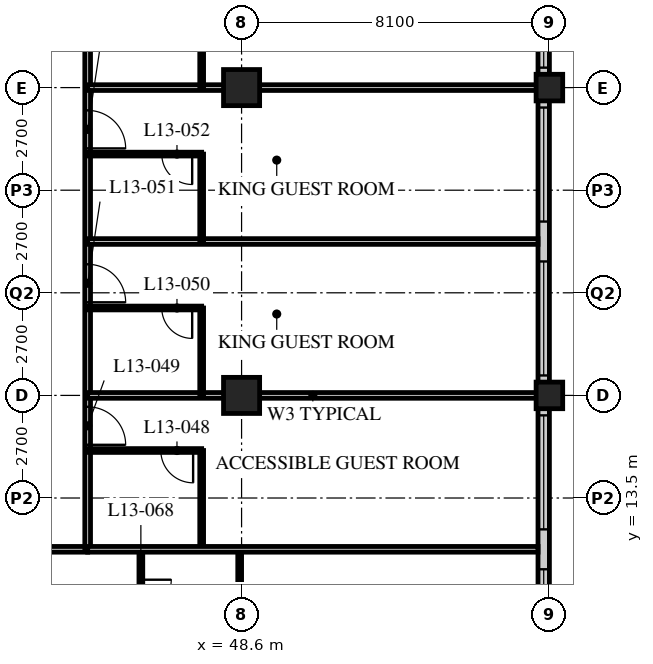
"""IFC4 building model, lengths in metres.
Left out: names, types, materials, properties, quantities, classifications, styles, units other than length and angle.
Written with IfcOpenShell. Run it as: python <this file> out.ifc"""

import sys

from ifc_helpers import new_model, si_unit, direction, frame, frame_2d, origin, origin_2d, place, context, subcontext, project, spatial, rectangle, hollow_rectangle, extrude, element, fill, save


model = new_model("IFC4")
c1 = context("Model", 3, precision=1e-05, world=origin(), true_north=direction((0.0, 1.0)))
c2 = subcontext(c1, "Body", "Model", "MODEL_VIEW")
j1 = project(units=[si_unit("LENGTHUNIT", "METRE"), si_unit("PLANEANGLEUNIT", "RADIAN")], contexts=[c1])
p1 = place(None, origin())
s1 = spatial("IfcSite", under=j1, at=p1, CompositionType="ELEMENT")
p2 = place(p1, origin())
s2 = spatial("IfcBuilding", under=s1, at=p2, CompositionType="ELEMENT")
p3 = place(p2, frame((0.0, 0.0, 56.8)))
s3 = spatial("IfcBuildingStorey", under=s2, at=p3, CompositionType="ELEMENT", Elevation=56.8)
for number, where, z_axis, x_axis in (
    (1, (48.6, 16.2, 0.0), (0.0, 0.0, 1.0), (1.0, 0.0, 0.0)),
    (2, (48.6, 24.3, 0.0), (0.0, 0.0, 1.0), (1.0, 0.0, 0.0)),
):
    element("IfcColumn", number, at=place(p3, frame(where, z_axis=z_axis, x_axis=x_axis)), inside=s3, PredefinedType="COLUMN", context=c2, shape_type="SweptSolid", body=[
        extrude(hollow_rectangle(XDim=0.95, YDim=0.95, WallThickness=0.095, at=origin_2d()), origin(), (0.0, 0.0, 1.0), 3.4),
    ])
for number, where, z_axis, x_axis in (
    (3, (56.7, 16.2, 0.0), (0.0, 0.0, 1.0), (1.0, 0.0, 0.0)),
    (4, (56.7, 24.3, 0.0), (0.0, 0.0, 1.0), (1.0, 0.0, 0.0)),
):
    element("IfcColumn", number, at=place(p3, frame(where, z_axis=z_axis, x_axis=x_axis)), inside=s3, PredefinedType="COLUMN", context=c2, shape_type="SweptSolid", body=[
        extrude(hollow_rectangle(XDim=0.7, YDim=0.7, WallThickness=0.06, at=origin_2d()), origin(), (0.0, 0.0, 1.0), 3.4),
    ])
p4 = place(p3, frame((56.55, 8.4, 0.0), z_axis=(0.0, 0.0, 1.0), x_axis=(0.0, 1.0, 0.0)))
e5 = element("IfcWall", 5, at=p4, inside=s3, PredefinedType="SOLIDWALL", context=c2, shape_type="SweptSolid", body=[
    extrude(rectangle(XDim=32.1, YDim=0.3, at=frame_2d((16.05, 0.0))), origin(), (0.0, 0.0, 1.0), 3.19),
])
p5 = place(p4, frame((0.225, 0.0, 0.9)))
e6 = element("IfcOpeningElement", 6, at=p5, cuts=e5, PredefinedType="OPENING", context=c2, shape_type="SweptSolid", body=[
    extrude(rectangle(XDim=3.0, YDim=2.0, at=frame_2d((1.5, 1.0))), frame((0.0, 0.16, 0.0), z_axis=(0.0, -1.0, 0.0), x_axis=(1.0, 0.0, 0.0)), (0.0, 0.0, 1.0), 0.32),
])
p6 = place(p4, frame((4.275, 0.0, 0.9)))
e7 = element("IfcOpeningElement", 7, at=p6, cuts=e5, PredefinedType="OPENING", context=c2, shape_type="SweptSolid", body=[
    extrude(rectangle(XDim=3.0, YDim=2.0, at=frame_2d((1.5, 1.0))), frame((0.0, 0.16, 0.0), z_axis=(0.0, -1.0, 0.0), x_axis=(1.0, 0.0, 0.0)), (0.0, 0.0, 1.0), 0.32),
])
p7 = place(p4, frame((8.325, 0.0, 0.9)))
e8 = element("IfcOpeningElement", 8, at=p7, cuts=e5, PredefinedType="OPENING", context=c2, shape_type="SweptSolid", body=[
    extrude(rectangle(XDim=3.0, YDim=2.0, at=frame_2d((1.5, 1.0))), frame((0.0, 0.16, 0.0), z_axis=(0.0, -1.0, 0.0), x_axis=(1.0, 0.0, 0.0)), (0.0, 0.0, 1.0), 0.32),
])
p8 = place(p4, frame((12.375, 0.0, 0.9)))
e9 = element("IfcOpeningElement", 9, at=p8, cuts=e5, PredefinedType="OPENING", context=c2, shape_type="SweptSolid", body=[
    extrude(rectangle(XDim=3.0, YDim=2.0, at=frame_2d((1.5, 1.0))), frame((0.0, 0.16, 0.0), z_axis=(0.0, -1.0, 0.0), x_axis=(1.0, 0.0, 0.0)), (0.0, 0.0, 1.0), 0.32),
])
p9 = place(p4, frame((16.425, 0.0, 0.9)))
e10 = element("IfcOpeningElement", 10, at=p9, cuts=e5, PredefinedType="OPENING", context=c2, shape_type="SweptSolid", body=[
    extrude(rectangle(XDim=3.0, YDim=2.0, at=frame_2d((1.5, 1.0))), frame((0.0, 0.16, 0.0), z_axis=(0.0, -1.0, 0.0), x_axis=(1.0, 0.0, 0.0)), (0.0, 0.0, 1.0), 0.32),
])
p10 = place(p4, frame((20.475, 0.0, 0.9)))
e11 = element("IfcOpeningElement", 11, at=p10, cuts=e5, PredefinedType="OPENING", context=c2, shape_type="SweptSolid", body=[
    extrude(rectangle(XDim=3.0, YDim=2.0, at=frame_2d((1.5, 1.0))), frame((0.0, 0.16, 0.0), z_axis=(0.0, -1.0, 0.0), x_axis=(1.0, 0.0, 0.0)), (0.0, 0.0, 1.0), 0.32),
])
p11 = place(p4, frame((24.525, 0.0, 0.9)))
e12 = element("IfcOpeningElement", 12, at=p11, cuts=e5, PredefinedType="OPENING", context=c2, shape_type="SweptSolid", body=[
    extrude(rectangle(XDim=3.0, YDim=2.0, at=frame_2d((1.5, 1.0))), frame((0.0, 0.16, 0.0), z_axis=(0.0, -1.0, 0.0), x_axis=(1.0, 0.0, 0.0)), (0.0, 0.0, 1.0), 0.32),
])
p12 = place(p4, frame((28.575, 0.0, 0.9)))
e13 = element("IfcOpeningElement", 13, at=p12, cuts=e5, PredefinedType="OPENING", context=c2, shape_type="SweptSolid", body=[
    extrude(rectangle(XDim=3.0, YDim=2.0, at=frame_2d((1.5, 1.0))), frame((0.0, 0.16, 0.0), z_axis=(0.0, -1.0, 0.0), x_axis=(1.0, 0.0, 0.0)), (0.0, 0.0, 1.0), 0.32),
])
p13 = place(p3, frame((12.15, 12.15, 0.0), z_axis=(0.0, 0.0, 1.0), x_axis=(1.0, 0.0, 0.0)))
e14 = element("IfcWall", 14, at=p13, inside=s3, PredefinedType="PARTITIONING", context=c2, shape_type="SweptSolid", body=[
    extrude(rectangle(XDim=32.4, YDim=0.15, at=frame_2d((16.2, 0.0))), origin(), (0.0, 0.0, 1.0), 3.19),
])
p14 = place(p13, frame((6.5, 0.0, 0.0)))
e15 = element("IfcOpeningElement", 15, at=p14, cuts=e14, PredefinedType="OPENING", context=c2, shape_type="SweptSolid", body=[
    extrude(rectangle(XDim=1.0, YDim=2.1, at=frame_2d((0.5, 1.05))), frame((0.0, 0.085, 0.0), z_axis=(0.0, -1.0, 0.0), x_axis=(1.0, 0.0, 0.0)), (0.0, 0.0, 1.0), 0.17),
])
p15 = place(p13, frame((8.4, 0.0, 0.0)))
e16 = element("IfcOpeningElement", 16, at=p15, cuts=e14, PredefinedType="OPENING", context=c2, shape_type="SweptSolid", body=[
    extrude(rectangle(XDim=1.0, YDim=2.1, at=frame_2d((0.5, 1.05))), frame((0.0, 0.085, 0.0), z_axis=(0.0, -1.0, 0.0), x_axis=(1.0, 0.0, 0.0)), (0.0, 0.0, 1.0), 0.17),
])
p16 = place(p13, frame((14.6, 0.0, 0.0)))
e17 = element("IfcOpeningElement", 17, at=p16, cuts=e14, PredefinedType="OPENING", context=c2, shape_type="SweptSolid", body=[
    extrude(rectangle(XDim=1.0, YDim=2.1, at=frame_2d((0.5, 1.05))), frame((0.0, 0.085, 0.0), z_axis=(0.0, -1.0, 0.0), x_axis=(1.0, 0.0, 0.0)), (0.0, 0.0, 1.0), 0.17),
])
p17 = place(p13, frame((18.65, 0.0, 0.0)))
e18 = element("IfcOpeningElement", 18, at=p17, cuts=e14, PredefinedType="OPENING", context=c2, shape_type="SweptSolid", body=[
    extrude(rectangle(XDim=1.0, YDim=2.1, at=frame_2d((0.5, 1.05))), frame((0.0, 0.085, 0.0), z_axis=(0.0, -1.0, 0.0), x_axis=(1.0, 0.0, 0.0)), (0.0, 0.0, 1.0), 0.17),
])
p18 = place(p13, frame((20.55, 0.0, 0.0)))
e19 = element("IfcOpeningElement", 19, at=p18, cuts=e14, PredefinedType="OPENING", context=c2, shape_type="SweptSolid", body=[
    extrude(rectangle(XDim=1.0, YDim=2.1, at=frame_2d((0.5, 1.05))), frame((0.0, 0.085, 0.0), z_axis=(0.0, -1.0, 0.0), x_axis=(1.0, 0.0, 0.0)), (0.0, 0.0, 1.0), 0.17),
])
p19 = place(p13, frame((26.75, 0.0, 0.0)))
e20 = element("IfcOpeningElement", 20, at=p19, cuts=e14, PredefinedType="OPENING", context=c2, shape_type="SweptSolid", body=[
    extrude(rectangle(XDim=1.0, YDim=2.1, at=frame_2d((0.5, 1.05))), frame((0.0, 0.085, 0.0), z_axis=(0.0, -1.0, 0.0), x_axis=(1.0, 0.0, 0.0)), (0.0, 0.0, 1.0), 0.17),
])
p20 = place(p13, frame((1.525, 0.0, 0.0)))
e21 = element("IfcOpeningElement", 21, at=p20, cuts=e14, PredefinedType="OPENING", context=c2, shape_type="SweptSolid", body=[
    extrude(rectangle(XDim=1.0, YDim=2.1, at=frame_2d((0.5, 1.05))), frame((0.0, 0.085, 0.0), z_axis=(0.0, -1.0, 0.0), x_axis=(1.0, 0.0, 0.0)), (0.0, 0.0, 1.0), 0.17),
])
p21 = place(p13, frame((29.875, 0.0, 0.0)))
e22 = element("IfcOpeningElement", 22, at=p21, cuts=e14, PredefinedType="OPENING", context=c2, shape_type="SweptSolid", body=[
    extrude(rectangle(XDim=1.0, YDim=2.1, at=frame_2d((0.5, 1.05))), frame((0.0, 0.085, 0.0), z_axis=(0.0, -1.0, 0.0), x_axis=(1.0, 0.0, 0.0)), (0.0, 0.0, 1.0), 0.17),
])
p22 = place(p3, frame((44.55, 12.15, 0.0), z_axis=(0.0, 0.0, 1.0), x_axis=(0.0, 1.0, 0.0)))
e23 = element("IfcWall", 23, at=p22, inside=s3, PredefinedType="PARTITIONING", context=c2, shape_type="SweptSolid", body=[
    extrude(rectangle(XDim=30.15, YDim=0.15, at=frame_2d((15.075, 0.0))), origin(), (0.0, 0.0, 1.0), 3.19),
])
p23 = place(p22, frame((2.75, 0.0, 0.0)))
e24 = element("IfcOpeningElement", 24, at=p23, cuts=e23, PredefinedType="OPENING", context=c2, shape_type="SweptSolid", body=[
    extrude(rectangle(XDim=1.0, YDim=2.1, at=frame_2d((0.5, 1.05))), frame((0.0, 0.085, 0.0), z_axis=(0.0, -1.0, 0.0), x_axis=(1.0, 0.0, 0.0)), (0.0, 0.0, 1.0), 0.17),
])
p24 = place(p22, frame((6.5, 0.0, 0.0)))
e25 = element("IfcOpeningElement", 25, at=p24, cuts=e23, PredefinedType="OPENING", context=c2, shape_type="SweptSolid", body=[
    extrude(rectangle(XDim=1.0, YDim=2.1, at=frame_2d((0.5, 1.05))), frame((0.0, 0.085, 0.0), z_axis=(0.0, -1.0, 0.0), x_axis=(1.0, 0.0, 0.0)), (0.0, 0.0, 1.0), 0.17),
])
p25 = place(p22, frame((10.55, 0.0, 0.0)))
e26 = element("IfcOpeningElement", 26, at=p25, cuts=e23, PredefinedType="OPENING", context=c2, shape_type="SweptSolid", body=[
    extrude(rectangle(XDim=1.0, YDim=2.1, at=frame_2d((0.5, 1.05))), frame((0.0, 0.085, 0.0), z_axis=(0.0, -1.0, 0.0), x_axis=(1.0, 0.0, 0.0)), (0.0, 0.0, 1.0), 0.17),
])
p26 = place(p22, frame((14.6, 0.0, 0.0)))
e27 = element("IfcOpeningElement", 27, at=p26, cuts=e23, PredefinedType="OPENING", context=c2, shape_type="SweptSolid", body=[
    extrude(rectangle(XDim=1.0, YDim=2.1, at=frame_2d((0.5, 1.05))), frame((0.0, 0.085, 0.0), z_axis=(0.0, -1.0, 0.0), x_axis=(1.0, 0.0, 0.0)), (0.0, 0.0, 1.0), 0.17),
])
p27 = place(p22, frame((18.65, 0.0, 0.0)))
e28 = element("IfcOpeningElement", 28, at=p27, cuts=e23, PredefinedType="OPENING", context=c2, shape_type="SweptSolid", body=[
    extrude(rectangle(XDim=1.0, YDim=2.1, at=frame_2d((0.5, 1.05))), frame((0.0, 0.085, 0.0), z_axis=(0.0, -1.0, 0.0), x_axis=(1.0, 0.0, 0.0)), (0.0, 0.0, 1.0), 0.17),
])
p28 = place(p22, frame((22.7, 0.0, 0.0)))
e29 = element("IfcOpeningElement", 29, at=p28, cuts=e23, PredefinedType="OPENING", context=c2, shape_type="SweptSolid", body=[
    extrude(rectangle(XDim=1.0, YDim=2.1, at=frame_2d((0.5, 1.05))), frame((0.0, 0.085, 0.0), z_axis=(0.0, -1.0, 0.0), x_axis=(1.0, 0.0, 0.0)), (0.0, 0.0, 1.0), 0.17),
])
p29 = place(p22, frame((26.7, 0.0, 0.0)))
e30 = element("IfcOpeningElement", 30, at=p29, cuts=e23, PredefinedType="OPENING", context=c2, shape_type="SweptSolid", body=[
    extrude(rectangle(XDim=1.0, YDim=2.1, at=frame_2d((0.5, 1.05))), frame((0.0, 0.085, 0.0), z_axis=(0.0, -1.0, 0.0), x_axis=(1.0, 0.0, 0.0)), (0.0, 0.0, 1.0), 0.17),
])
p30 = place(p3, frame((47.55, 12.15, 0.0), z_axis=(0.0, 0.0, 1.0), x_axis=(0.0, 1.0, 0.0)))
e31 = element("IfcWall", 31, at=p30, inside=s3, PredefinedType="PARTITIONING", context=c2, shape_type="SweptSolid", body=[
    extrude(rectangle(XDim=2.6, YDim=0.1, at=frame_2d((1.3, 0.0))), origin(), (0.0, 0.0, 1.0), 3.19),
])
p31 = place(p3, frame((44.55, 14.75, 0.0), z_axis=(0.0, 0.0, 1.0), x_axis=(1.0, 0.0, 0.0)))
e32 = element("IfcWall", 32, at=p31, inside=s3, PredefinedType="PARTITIONING", context=c2, shape_type="SweptSolid", body=[
    extrude(rectangle(XDim=3.0, YDim=0.1, at=frame_2d((1.5, 0.0))), origin(), (0.0, 0.0, 1.0), 3.19),
])
p32 = place(p31, frame((1.925, 0.0, 0.0)))
e33 = element("IfcOpeningElement", 33, at=p32, cuts=e32, PredefinedType="OPENING", context=c2, shape_type="SweptSolid", body=[
    extrude(rectangle(XDim=0.85, YDim=2.1, at=frame_2d((0.425, 1.05))), frame((0.0, 0.06, 0.0), z_axis=(0.0, -1.0, 0.0), x_axis=(1.0, 0.0, 0.0)), (0.0, 0.0, 1.0), 0.12),
])
p33 = place(p3, frame((44.55, 16.2, 0.0), z_axis=(0.0, 0.0, 1.0), x_axis=(1.0, 0.0, 0.0)))
e34 = element("IfcWall", 34, at=p33, inside=s3, PredefinedType="PARTITIONING", context=c2, shape_type="SweptSolid", body=[
    extrude(rectangle(XDim=11.85, YDim=0.15, at=frame_2d((5.925, 0.0))), origin(), (0.0, 0.0, 1.0), 2.578),
])
p34 = place(p3, frame((47.55, 16.2, 0.0), z_axis=(0.0, 0.0, 1.0), x_axis=(0.0, 1.0, 0.0)))
e35 = element("IfcWall", 35, at=p34, inside=s3, PredefinedType="PARTITIONING", context=c2, shape_type="SweptSolid", body=[
    extrude(rectangle(XDim=2.3, YDim=0.1, at=frame_2d((1.15, 0.0))), origin(), (0.0, 0.0, 1.0), 3.19),
])
p35 = place(p3, frame((44.55, 18.5, 0.0), z_axis=(0.0, 0.0, 1.0), x_axis=(1.0, 0.0, 0.0)))
e36 = element("IfcWall", 36, at=p35, inside=s3, PredefinedType="PARTITIONING", context=c2, shape_type="SweptSolid", body=[
    extrude(rectangle(XDim=3.0, YDim=0.1, at=frame_2d((1.5, 0.0))), origin(), (0.0, 0.0, 1.0), 3.19),
])
p36 = place(p35, frame((1.95, 0.0, 0.0)))
e37 = element("IfcOpeningElement", 37, at=p36, cuts=e36, PredefinedType="OPENING", context=c2, shape_type="SweptSolid", body=[
    extrude(rectangle(XDim=0.8, YDim=2.1, at=frame_2d((0.4, 1.05))), frame((0.0, 0.06, 0.0), z_axis=(0.0, -1.0, 0.0), x_axis=(1.0, 0.0, 0.0)), (0.0, 0.0, 1.0), 0.12),
])
p37 = place(p3, frame((44.55, 20.25, 0.0), z_axis=(0.0, 0.0, 1.0), x_axis=(1.0, 0.0, 0.0)))
e38 = element("IfcWall", 38, at=p37, inside=s3, PredefinedType="PARTITIONING", context=c2, shape_type="SweptSolid", body=[
    extrude(rectangle(XDim=11.85, YDim=0.15, at=frame_2d((5.925, 0.0))), origin(), (0.0, 0.0, 1.0), 3.19),
])
p38 = place(p3, frame((47.55, 20.25, 0.0), z_axis=(0.0, 0.0, 1.0), x_axis=(0.0, 1.0, 0.0)))
e39 = element("IfcWall", 39, at=p38, inside=s3, PredefinedType="PARTITIONING", context=c2, shape_type="SweptSolid", body=[
    extrude(rectangle(XDim=2.3, YDim=0.1, at=frame_2d((1.15, 0.0))), origin(), (0.0, 0.0, 1.0), 3.19),
])
p39 = place(p3, frame((44.55, 22.55, 0.0), z_axis=(0.0, 0.0, 1.0), x_axis=(1.0, 0.0, 0.0)))
e40 = element("IfcWall", 40, at=p39, inside=s3, PredefinedType="PARTITIONING", context=c2, shape_type="SweptSolid", body=[
    extrude(rectangle(XDim=3.0, YDim=0.1, at=frame_2d((1.5, 0.0))), origin(), (0.0, 0.0, 1.0), 3.19),
])
p40 = place(p39, frame((1.95, 0.0, 0.0)))
e41 = element("IfcOpeningElement", 41, at=p40, cuts=e40, PredefinedType="OPENING", context=c2, shape_type="SweptSolid", body=[
    extrude(rectangle(XDim=0.8, YDim=2.1, at=frame_2d((0.4, 1.05))), frame((0.0, 0.06, 0.0), z_axis=(0.0, -1.0, 0.0), x_axis=(1.0, 0.0, 0.0)), (0.0, 0.0, 1.0), 0.12),
])
p41 = place(p3, frame((44.55, 24.3, 0.0), z_axis=(0.0, 0.0, 1.0), x_axis=(1.0, 0.0, 0.0)))
e42 = element("IfcWall", 42, at=p41, inside=s3, PredefinedType="PARTITIONING", context=c2, shape_type="SweptSolid", body=[
    extrude(rectangle(XDim=11.85, YDim=0.15, at=frame_2d((5.925, 0.0))), origin(), (0.0, 0.0, 1.0), 2.578),
])
p42 = place(p3, frame((47.55, 24.3, 0.0), z_axis=(0.0, 0.0, 1.0), x_axis=(0.0, 1.0, 0.0)))
e43 = element("IfcWall", 43, at=p42, inside=s3, PredefinedType="PARTITIONING", context=c2, shape_type="SweptSolid", body=[
    extrude(rectangle(XDim=2.3, YDim=0.1, at=frame_2d((1.15, 0.0))), origin(), (0.0, 0.0, 1.0), 3.19),
])
p43 = place(p3, frame((45.95, 12.15, 0.0), z_axis=(0.0, 0.0, 1.0), x_axis=(0.0, -1.0, 0.0)))
e44 = element("IfcWall", 44, at=p43, inside=s3, PredefinedType="PARTITIONING", context=c2, shape_type="SweptSolid", body=[
    extrude(rectangle(XDim=2.4, YDim=0.1, at=frame_2d((1.2, 0.0))), origin(), (0.0, 0.0, 1.0), 3.19),
])
p44 = place(p43, frame((0.8, 0.0, 0.0)))
e45 = element("IfcOpeningElement", 45, at=p44, cuts=e44, PredefinedType="OPENING", context=c2, shape_type="SweptSolid", body=[
    extrude(rectangle(XDim=0.8, YDim=2.1, at=frame_2d((0.4, 1.05))), frame((0.0, 0.06, 0.0), z_axis=(0.0, -1.0, 0.0), x_axis=(1.0, 0.0, 0.0)), (0.0, 0.0, 1.0), 0.12),
])
p45 = place(p3, frame((48.55, 12.15, 0.0), z_axis=(0.0, 0.0, 1.0), x_axis=(0.0, -1.0, 0.0)))
e46 = element("IfcWall", 46, at=p45, inside=s3, PredefinedType="PARTITIONING", context=c2, shape_type="SweptSolid", body=[
    extrude(rectangle(XDim=2.4, YDim=0.1, at=frame_2d((1.2, 0.0))), origin(), (0.0, 0.0, 1.0), 2.578),
])
p46 = place(p3, frame((44.55, 12.15, 0.0), z_axis=(0.0, 0.0, 1.0), x_axis=(1.0, 0.0, 0.0)))
e47 = element("IfcWall", 47, at=p46, inside=s3, PredefinedType="PARTITIONING", context=c2, shape_type="SweptSolid", body=[
    extrude(rectangle(XDim=11.85, YDim=0.15, at=frame_2d((5.925, 0.0))), origin(), (0.0, 0.0, 1.0), 3.19),
])
p47 = place(p5, origin())
e48 = element("IfcWindow", 48, at=p47, inside=s3, PartitioningType="SINGLE_PANEL", PredefinedType="WINDOW", context=c2, shape_type="SweptSolid", body=[
    extrude(rectangle(XDim=3.0, YDim=2.0, at=frame_2d((1.5, 1.0))), frame((0.0, 0.03, 0.0), z_axis=(0.0, -1.0, 0.0), x_axis=(1.0, 0.0, 0.0)), (0.0, 0.0, 1.0), 0.06),
])
fill(e6, e48)
p48 = place(p6, origin())
e49 = element("IfcWindow", 49, at=p48, inside=s3, PartitioningType="SINGLE_PANEL", PredefinedType="WINDOW", context=c2, shape_type="SweptSolid", body=[
    extrude(rectangle(XDim=3.0, YDim=2.0, at=frame_2d((1.5, 1.0))), frame((0.0, 0.03, 0.0), z_axis=(0.0, -1.0, 0.0), x_axis=(1.0, 0.0, 0.0)), (0.0, 0.0, 1.0), 0.06),
])
fill(e7, e49)
p49 = place(p7, origin())
e50 = element("IfcWindow", 50, at=p49, inside=s3, PartitioningType="SINGLE_PANEL", PredefinedType="WINDOW", context=c2, shape_type="SweptSolid", body=[
    extrude(rectangle(XDim=3.0, YDim=2.0, at=frame_2d((1.5, 1.0))), frame((0.0, 0.03, 0.0), z_axis=(0.0, -1.0, 0.0), x_axis=(1.0, 0.0, 0.0)), (0.0, 0.0, 1.0), 0.06),
])
fill(e8, e50)
p50 = place(p8, origin())
e51 = element("IfcWindow", 51, at=p50, inside=s3, PartitioningType="SINGLE_PANEL", PredefinedType="WINDOW", context=c2, shape_type="SweptSolid", body=[
    extrude(rectangle(XDim=3.0, YDim=2.0, at=frame_2d((1.5, 1.0))), frame((0.0, 0.03, 0.0), z_axis=(0.0, -1.0, 0.0), x_axis=(1.0, 0.0, 0.0)), (0.0, 0.0, 1.0), 0.06),
])
fill(e9, e51)
p51 = place(p9, origin())
e52 = element("IfcWindow", 52, at=p51, inside=s3, PartitioningType="SINGLE_PANEL", PredefinedType="WINDOW", context=c2, shape_type="SweptSolid", body=[
    extrude(rectangle(XDim=3.0, YDim=2.0, at=frame_2d((1.5, 1.0))), frame((0.0, 0.03, 0.0), z_axis=(0.0, -1.0, 0.0), x_axis=(1.0, 0.0, 0.0)), (0.0, 0.0, 1.0), 0.06),
])
fill(e10, e52)
p52 = place(p32, origin())
e53 = element("IfcDoor", 53, at=p52, inside=s3, OperationType="SINGLE_SWING_LEFT", PredefinedType="DOOR", context=c2, shape_type="SweptSolid", body=[
    extrude(rectangle(XDim=0.85, YDim=2.1, at=frame_2d((0.425, 1.05))), frame((0.0, 0.025, 0.0), z_axis=(0.0, -1.0, 0.0), x_axis=(1.0, 0.0, 0.0)), (0.0, 0.0, 1.0), 0.05),
])
fill(e33, e53)
p53 = place(p23, origin())
e54 = element("IfcDoor", 54, at=p53, inside=s3, OperationType="SINGLE_SWING_RIGHT", PredefinedType="DOOR", context=c2, shape_type="SweptSolid", body=[
    extrude(rectangle(XDim=1.0, YDim=2.1, at=frame_2d((0.5, 1.05))), frame((0.0, 0.025, 0.0), z_axis=(0.0, -1.0, 0.0), x_axis=(1.0, 0.0, 0.0)), (0.0, 0.0, 1.0), 0.05),
])
fill(e24, e54)
p54 = place(p36, origin())
e55 = element("IfcDoor", 55, at=p54, inside=s3, OperationType="SINGLE_SWING_LEFT", PredefinedType="DOOR", context=c2, shape_type="SweptSolid", body=[
    extrude(rectangle(XDim=0.8, YDim=2.1, at=frame_2d((0.4, 1.05))), frame((0.0, 0.025, 0.0), z_axis=(0.0, -1.0, 0.0), x_axis=(1.0, 0.0, 0.0)), (0.0, 0.0, 1.0), 0.05),
])
fill(e37, e55)
p55 = place(p24, origin())
e56 = element("IfcDoor", 56, at=p55, inside=s3, OperationType="SINGLE_SWING_RIGHT", PredefinedType="DOOR", context=c2, shape_type="SweptSolid", body=[
    extrude(rectangle(XDim=1.0, YDim=2.1, at=frame_2d((0.5, 1.05))), frame((0.0, 0.025, 0.0), z_axis=(0.0, -1.0, 0.0), x_axis=(1.0, 0.0, 0.0)), (0.0, 0.0, 1.0), 0.05),
])
fill(e25, e56)
p56 = place(p40, origin())
e57 = element("IfcDoor", 57, at=p56, inside=s3, OperationType="SINGLE_SWING_LEFT", PredefinedType="DOOR", context=c2, shape_type="SweptSolid", body=[
    extrude(rectangle(XDim=0.8, YDim=2.1, at=frame_2d((0.4, 1.05))), frame((0.0, 0.025, 0.0), z_axis=(0.0, -1.0, 0.0), x_axis=(1.0, 0.0, 0.0)), (0.0, 0.0, 1.0), 0.05),
])
fill(e41, e57)
p57 = place(p25, origin())
e58 = element("IfcDoor", 58, at=p57, inside=s3, OperationType="SINGLE_SWING_RIGHT", PredefinedType="DOOR", context=c2, shape_type="SweptSolid", body=[
    extrude(rectangle(XDim=1.0, YDim=2.1, at=frame_2d((0.5, 1.05))), frame((0.0, 0.025, 0.0), z_axis=(0.0, -1.0, 0.0), x_axis=(1.0, 0.0, 0.0)), (0.0, 0.0, 1.0), 0.05),
])
fill(e26, e58)
p58 = place(p44, origin())
e59 = element("IfcDoor", 59, at=p58, inside=s3, OperationType="SINGLE_SWING_LEFT", PredefinedType="DOOR", context=c2, shape_type="SweptSolid", body=[
    extrude(rectangle(XDim=0.8, YDim=2.1, at=frame_2d((0.4, 1.05))), frame((0.0, 0.025, 0.0), z_axis=(0.0, -1.0, 0.0), x_axis=(1.0, 0.0, 0.0)), (0.0, 0.0, 1.0), 0.05),
])
fill(e45, e59)
save(model, sys.argv[1])
